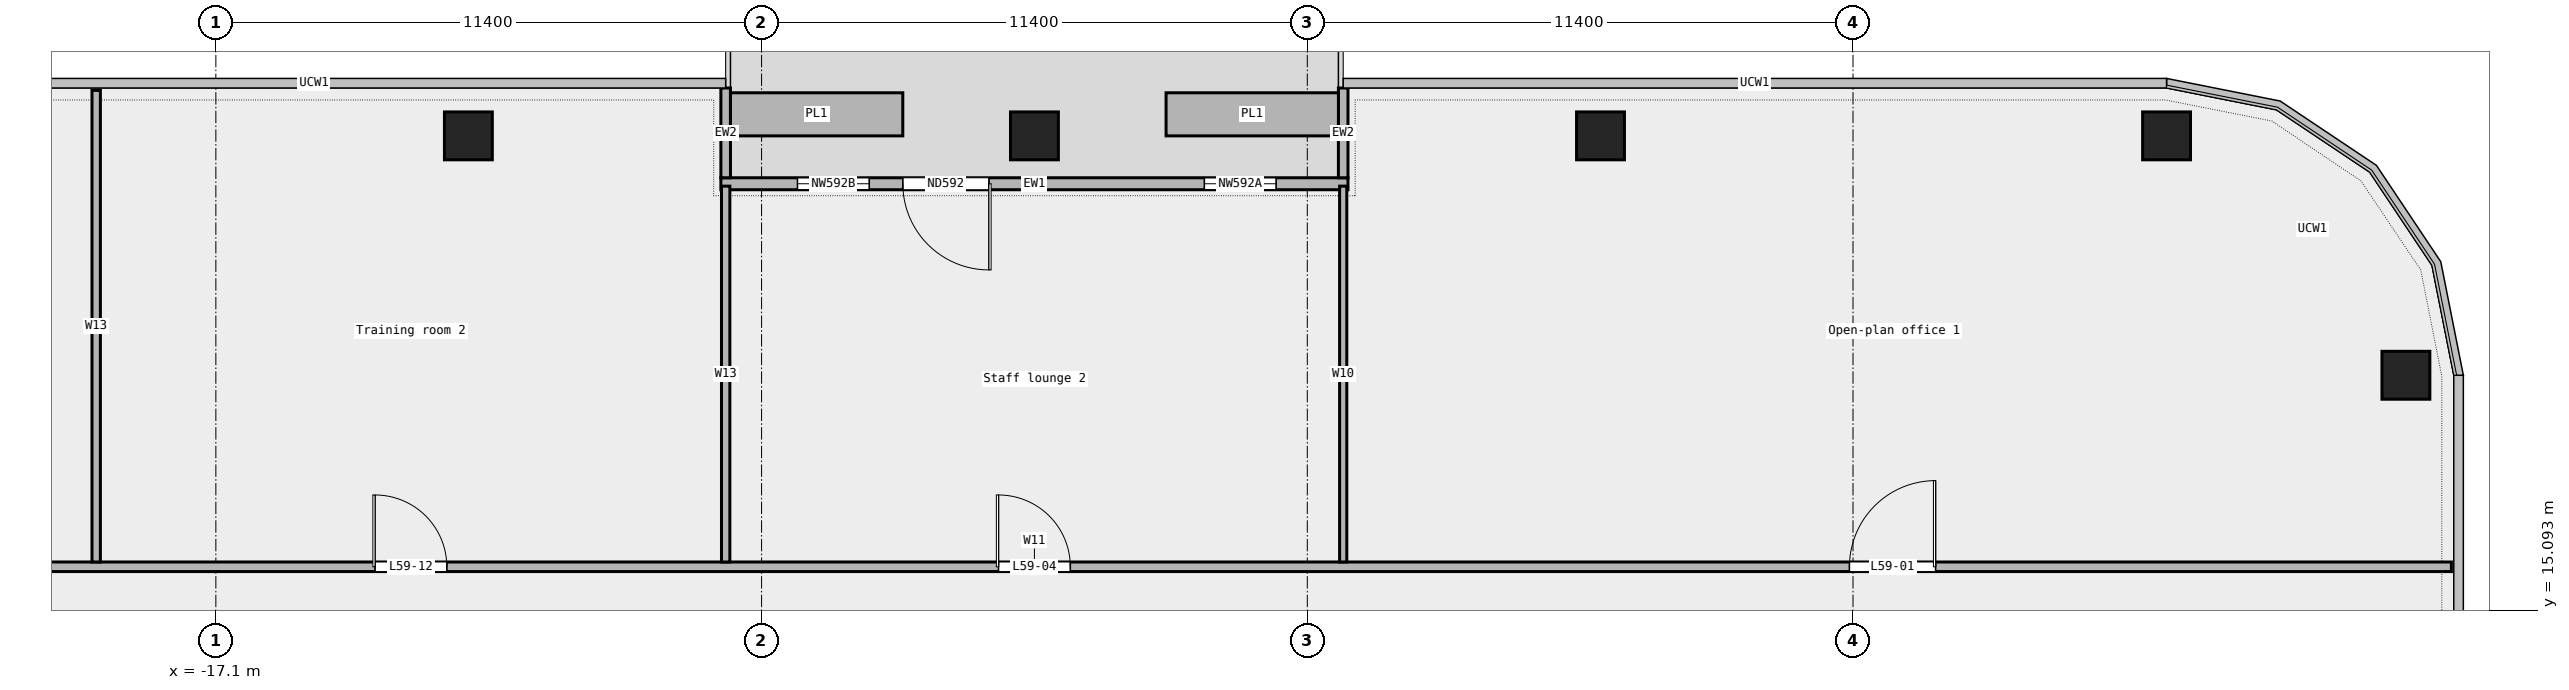
"""IFC4 building model, lengths in metres.
Left out: names, types, materials, properties, quantities, classifications, styles, units other than length and angle.
Written with IfcOpenShell. Run it as: python <this file> out.ifc"""

import sys

from ifc_helpers import new_model, si_unit, direction, frame, frame_2d, origin, origin_2d, place, context, subcontext, project, spatial, rectangle, extrude, element, fill, save


model = new_model("IFC4")
c1 = context("Model", 3, precision=1e-05, world=origin(), true_north=direction((0.0, 1.0)))
c2 = subcontext(c1, "Body", "Model", "MODEL_VIEW")
j1 = project(units=[si_unit("LENGTHUNIT", "METRE"), si_unit("PLANEANGLEUNIT", "RADIAN")], contexts=[c1])
p1 = place(None, origin())
s1 = spatial("IfcSite", under=j1, at=p1, CompositionType="ELEMENT")
p2 = place(p1, origin())
s2 = spatial("IfcBuilding", under=s1, at=p2, CompositionType="ELEMENT")
p3 = place(p2, frame((0.0, 0.0, 275.4)))
s3 = spatial("IfcBuildingStorey", under=s2, at=p3, CompositionType="ELEMENT", Elevation=275.4)
for number, where, z_axis, x_axis in (
    (1, (28.65, 20.0, 0.0), (0.0, 0.0, 1.0), (1.0, 0.0, 0.0)),
    (2, (23.65, 25.0, 0.0), (0.0, 0.0, 1.0), (1.0, 0.0, 0.0)),
    (3, (11.825, 25.0, 0.0), (0.0, 0.0, 1.0), (1.0, 0.0, 0.0)),
    (4, (0.0, 25.0, 0.0), (0.0, 0.0, 1.0), (1.0, 0.0, 0.0)),
    (5, (-11.825, 25.0, 0.0), (0.0, 0.0, 1.0), (1.0, 0.0, 0.0)),
):
    element("IfcColumn", number, at=place(p3, frame(where, z_axis=z_axis, x_axis=x_axis)), inside=s3, PredefinedType="COLUMN", context=c2, shape_type="SweptSolid", body=[
        extrude(rectangle(XDim=1.0, YDim=1.0, at=origin_2d()), origin(), (0.0, 0.0, 1.0), 3.6),
    ])
p4 = place(p3, frame((6.55, 24.0, 0.0), z_axis=(0.0, 0.0, 1.0), x_axis=(-1.0, 0.0, 0.0)))
e6 = element("IfcWall", 6, at=p4, inside=s3, PredefinedType="STANDARD", context=c2, shape_type="SweptSolid", body=[
    extrude(rectangle(XDim=13.1, YDim=0.25, at=frame_2d((6.55, 0.0))), origin(), (0.0, 0.0, 1.0), 3.6),
])
p5 = place(p4, frame((1.5, 0.0, 0.45)))
e7 = element("IfcOpeningElement", 7, at=p5, cuts=e6, PredefinedType="OPENING", context=c2, shape_type="SweptSolid", body=[
    extrude(rectangle(XDim=1.5, YDim=2.4, at=frame_2d((0.75, 1.2))), frame((0.0, 0.137, 0.0), z_axis=(0.0, -1.0, 0.0), x_axis=(1.0, 0.0, 0.0)), (0.0, 0.0, 1.0), 0.274),
])
p6 = place(p4, frame((7.5, 0.0, 0.0)))
e8 = element("IfcOpeningElement", 8, at=p6, cuts=e6, PredefinedType="OPENING", context=c2, shape_type="SweptSolid", body=[
    extrude(rectangle(XDim=1.8, YDim=2.4, at=frame_2d((0.9, 1.2))), frame((0.0, 0.137, 0.0), z_axis=(0.0, -1.0, 0.0), x_axis=(1.0, 0.0, 0.0)), (0.0, 0.0, 1.0), 0.274),
])
p7 = place(p4, frame((10.0, 0.0, 0.45)))
e9 = element("IfcOpeningElement", 9, at=p7, cuts=e6, PredefinedType="OPENING", context=c2, shape_type="SweptSolid", body=[
    extrude(rectangle(XDim=1.5, YDim=2.4, at=frame_2d((0.75, 1.2))), frame((0.0, 0.137, 0.0), z_axis=(0.0, -1.0, 0.0), x_axis=(1.0, 0.0, 0.0)), (0.0, 0.0, 1.0), 0.274),
])
for number, where, z_axis, x_axis in (
    (10, (6.45, 26.0, 0.0), (0.0, 0.0, 1.0), (0.0, -1.0, 0.0)),
    (11, (-6.45, 26.0, 0.0), (0.0, 0.0, 1.0), (0.0, -1.0, 0.0)),
):
    element("IfcWall", number, at=place(p3, frame(where, z_axis=z_axis, x_axis=x_axis)), inside=s3, PredefinedType="STANDARD", context=c2, shape_type="SweptSolid", body=[
        extrude(rectangle(XDim=1.875, YDim=0.2, at=frame_2d((0.938, 0.0))), origin(), (0.0, 0.0, 1.0), 3.6),
    ])
for number, where, z_axis, x_axis in (
    (12, (6.35, 25.45, 0.0), (0.0, 0.0, 1.0), (-1.0, 0.0, 0.0)),
    (13, (-2.75, 25.45, 0.0), (0.0, 0.0, 1.0), (-1.0, 0.0, 0.0)),
):
    element("IfcWall", number, at=place(p3, frame(where, z_axis=z_axis, x_axis=x_axis)), inside=s3, PredefinedType="STANDARD", context=c2, shape_type="SweptSolid", body=[
        extrude(rectangle(XDim=3.6, YDim=0.9, at=frame_2d((1.8, 0.0))), origin(), (0.0, 0.0, 1.0), 0.7),
    ])
p8 = place(p3, frame((-29.6, 16.0, 0.0), z_axis=(0.0, 0.0, 1.0), x_axis=(1.0, 0.0, 0.0)))
e14 = element("IfcWall", 14, at=p8, inside=s3, PredefinedType="PARTITIONING", context=c2, shape_type="SweptSolid", body=[
    extrude(rectangle(XDim=59.2, YDim=0.2, at=frame_2d((29.6, 0.0))), origin(), (0.0, 0.0, 1.0), 3.6),
])
p9 = place(p8, frame((46.625, 0.0, 0.0)))
e15 = element("IfcOpeningElement", 15, at=p9, cuts=e14, PredefinedType="OPENING", context=c2, shape_type="SweptSolid", body=[
    extrude(rectangle(XDim=1.8, YDim=2.1, at=frame_2d((0.9, 1.05))), frame((0.0, 0.112, 0.0), z_axis=(0.0, -1.0, 0.0), x_axis=(1.0, 0.0, 0.0)), (0.0, 0.0, 1.0), 0.224),
])
p10 = place(p8, frame((28.85, 0.0, 0.0)))
e16 = element("IfcOpeningElement", 16, at=p10, cuts=e14, PredefinedType="OPENING", context=c2, shape_type="SweptSolid", body=[
    extrude(rectangle(XDim=1.5, YDim=2.1, at=frame_2d((0.75, 1.05))), frame((0.0, 0.112, 0.0), z_axis=(0.0, -1.0, 0.0), x_axis=(1.0, 0.0, 0.0)), (0.0, 0.0, 1.0), 0.224),
])
p11 = place(p8, frame((4.5, 0.0, 0.0)))
e17 = element("IfcOpeningElement", 17, at=p11, cuts=e14, PredefinedType="OPENING", context=c2, shape_type="SweptSolid", body=[
    extrude(rectangle(XDim=1.2, YDim=2.1, at=frame_2d((0.6, 1.05))), frame((0.0, 0.112, 0.0), z_axis=(0.0, -1.0, 0.0), x_axis=(1.0, 0.0, 0.0)), (0.0, 0.0, 1.0), 0.224),
])
p12 = place(p8, frame((15.825, 0.0, 0.0)))
e18 = element("IfcOpeningElement", 18, at=p12, cuts=e14, PredefinedType="OPENING", context=c2, shape_type="SweptSolid", body=[
    extrude(rectangle(XDim=1.5, YDim=2.1, at=frame_2d((0.75, 1.05))), frame((0.0, 0.112, 0.0), z_axis=(0.0, -1.0, 0.0), x_axis=(1.0, 0.0, 0.0)), (0.0, 0.0, 1.0), 0.224),
])
p13 = place(p3, frame((-19.6, 16.1, 0.0), z_axis=(0.0, 0.0, 1.0), x_axis=(0.0, 1.0, 0.0)))
e19 = element("IfcWall", 19, at=p13, inside=s3, PredefinedType="PARTITIONING", context=c2, shape_type="SweptSolid", body=[
    extrude(rectangle(XDim=9.85, YDim=0.175, at=frame_2d((4.925, 0.0))), origin(), (0.0, 0.0, 1.0), 3.6),
])
p14 = place(p3, frame((-6.45, 16.1, 0.0), z_axis=(0.0, 0.0, 1.0), x_axis=(0.0, 1.0, 0.0)))
e20 = element("IfcWall", 20, at=p14, inside=s3, PredefinedType="PARTITIONING", context=c2, shape_type="SweptSolid", body=[
    extrude(rectangle(XDim=7.85, YDim=0.175, at=frame_2d((3.925, 0.0))), origin(), (0.0, 0.0, 1.0), 3.6),
])
p15 = place(p3, frame((6.45, 16.1, 0.0), z_axis=(0.0, 0.0, 1.0), x_axis=(0.0, 1.0, 0.0)))
e21 = element("IfcWall", 21, at=p15, inside=s3, PredefinedType="PARTITIONING", context=c2, shape_type="SweptSolid", body=[
    extrude(rectangle(XDim=7.85, YDim=0.15, at=frame_2d((3.925, 0.0))), origin(), (0.0, 0.0, 1.0), 3.6),
])
p16 = place(p5, origin())
e22 = element("IfcWindow", 22, at=p16, inside=s3, PartitioningType="SINGLE_PANEL", PredefinedType="WINDOW", context=c2, shape_type="SweptSolid", body=[
    extrude(rectangle(XDim=1.5, YDim=2.4, at=frame_2d((0.75, 1.2))), frame((0.0, 0.03, 0.0), z_axis=(0.0, -1.0, 0.0), x_axis=(1.0, 0.0, 0.0)), (0.0, 0.0, 1.0), 0.06),
])
fill(e7, e22)
p17 = place(p6, origin())
e23 = element("IfcDoor", 23, at=p17, inside=s3, OperationType="DOUBLE_DOOR_SINGLE_SWING", PredefinedType="DOOR", context=c2, shape_type="SweptSolid", body=[
    extrude(rectangle(XDim=1.8, YDim=2.4, at=frame_2d((0.9, 1.2))), frame((0.0, 0.025, 0.0), z_axis=(0.0, -1.0, 0.0), x_axis=(1.0, 0.0, 0.0)), (0.0, 0.0, 1.0), 0.05),
])
fill(e8, e23)
p18 = place(p7, origin())
e24 = element("IfcWindow", 24, at=p18, inside=s3, PartitioningType="SINGLE_PANEL", PredefinedType="WINDOW", context=c2, shape_type="SweptSolid", body=[
    extrude(rectangle(XDim=1.5, YDim=2.4, at=frame_2d((0.75, 1.2))), frame((0.0, 0.03, 0.0), z_axis=(0.0, -1.0, 0.0), x_axis=(1.0, 0.0, 0.0)), (0.0, 0.0, 1.0), 0.06),
])
fill(e9, e24)
p19 = place(p9, origin())
e25 = element("IfcDoor", 25, at=p19, inside=s3, OperationType="DOUBLE_DOOR_SINGLE_SWING", PredefinedType="DOOR", context=c2, shape_type="SweptSolid", body=[
    extrude(rectangle(XDim=1.8, YDim=2.1, at=frame_2d((0.9, 1.05))), frame((0.0, 0.025, 0.0), z_axis=(0.0, -1.0, 0.0), x_axis=(1.0, 0.0, 0.0)), (0.0, 0.0, 1.0), 0.05),
])
fill(e15, e25)
p20 = place(p10, origin())
e26 = element("IfcDoor", 26, at=p20, inside=s3, OperationType="DOUBLE_DOOR_SINGLE_SWING", PredefinedType="DOOR", context=c2, shape_type="SweptSolid", body=[
    extrude(rectangle(XDim=1.5, YDim=2.1, at=frame_2d((0.75, 1.05))), frame((0.0, 0.025, 0.0), z_axis=(0.0, -1.0, 0.0), x_axis=(1.0, 0.0, 0.0)), (0.0, 0.0, 1.0), 0.05),
])
fill(e16, e26)
p21 = place(p12, origin())
e27 = element("IfcDoor", 27, at=p21, inside=s3, OperationType="DOUBLE_DOOR_SINGLE_SWING", PredefinedType="DOOR", context=c2, shape_type="SweptSolid", body=[
    extrude(rectangle(XDim=1.5, YDim=2.1, at=frame_2d((0.75, 1.05))), frame((0.0, 0.025, 0.0), z_axis=(0.0, -1.0, 0.0), x_axis=(1.0, 0.0, 0.0)), (0.0, 0.0, 1.0), 0.05),
])
fill(e18, e27)
save(model, sys.argv[1])
